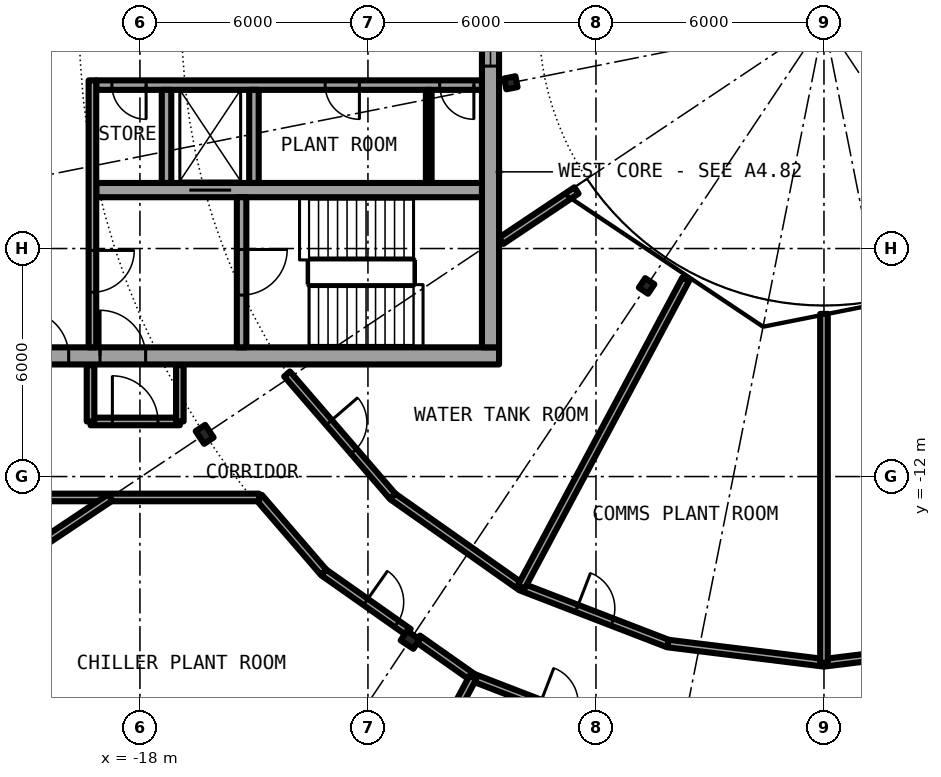
"""IFC4 building model, lengths in metres.
Left out: names, types, materials, properties, quantities, classifications, styles, units other than length and angle.
Written with IfcOpenShell. Run it as: python <this file> out.ifc"""

import sys

from ifc_helpers import new_model, si_unit, direction, frame, frame_2d, origin, origin_2d, place, context, subcontext, project, spatial, rectangle, i_section, extrude, element, fill, save


model = new_model("IFC4")
c1 = context("Model", 3, precision=1e-05, world=origin(), true_north=direction((0.0, 1.0)))
c2 = subcontext(c1, "Body", "Model", "MODEL_VIEW")
j1 = project(units=[si_unit("LENGTHUNIT", "METRE"), si_unit("PLANEANGLEUNIT", "RADIAN")], contexts=[c1])
p1 = place(None, origin())
s1 = spatial("IfcSite", under=j1, at=p1, CompositionType="ELEMENT")
p2 = place(p1, origin())
s2 = spatial("IfcBuilding", under=s1, at=p2, CompositionType="ELEMENT")
p3 = place(p2, frame((0.0, 0.0, 186.0)))
s3 = spatial("IfcBuildingStorey", under=s2, at=p3, CompositionType="ELEMENT", Elevation=186.0)
for number, where, z_axis, x_axis in (
    (1, (-16.297, -10.889, 0.0), (0.0, 0.0, 1.0), (-0.831, -0.556, 0.0)),
    (2, (-10.889, -16.297, 0.0), (0.0, 0.0, 1.0), (-0.556, -0.831, 0.0)),
):
    element("IfcColumn", number, at=place(p3, frame(where, z_axis=z_axis, x_axis=x_axis)), inside=s3, PredefinedType="COLUMN", context=c2, shape_type="SweptSolid", body=[
        extrude(i_section(OverallWidth=0.3, OverallDepth=0.4, WebThickness=0.013, FlangeThickness=0.024, FilletRadius=0.027, at=origin_2d()), origin(), (0.0, 0.0, 1.0), 4.2),
    ])
for number, where, z_axis, x_axis in (
    (3, (-8.239, -1.639, 0.0), (0.0, 0.0, 1.0), (-0.981, -0.195, 0.0)),
    (4, (-4.667, -6.984, 0.0), (0.0, 0.0, 1.0), (-0.556, -0.831, 0.0)),
):
    element("IfcColumn", number, at=place(p3, frame(where, z_axis=z_axis, x_axis=x_axis)), inside=s3, PredefinedType="COLUMN", context=c2, shape_type="SweptSolid", body=[
        extrude(i_section(OverallWidth=0.3, OverallDepth=0.29, WebThickness=0.009, FlangeThickness=0.014, FilletRadius=0.027, at=origin_2d()), origin(), (0.0, 0.0, 1.0), 4.2),
    ])
p4 = place(p3, frame((-23.967, -16.014, 0.0), z_axis=(0.0, 0.0, 1.0), x_axis=(0.634403999748, -0.773001659186, 0.0)))
e5 = element("IfcWall", 5, at=p4, inside=s3, PredefinedType="SOLIDWALL", context=c2, shape_type="SweptSolid", body=[
    extrude(rectangle(XDim=5.651, YDim=0.25, at=frame_2d((2.825, 0.0))), origin(), (0.0, 0.0, 1.0), 3.85),
])
p5 = place(p3, frame((-22.05, -8.825, 0.0), z_axis=(0.0, 0.0, 1.0), x_axis=(1.0, 0.0, 0.0)))
e6 = element("IfcWall", 6, at=p5, inside=s3, PredefinedType="SHEAR", context=c2, shape_type="SweptSolid", body=[
    extrude(rectangle(XDim=13.5, YDim=0.45, at=frame_2d((6.75, 0.0))), origin(), (0.0, 0.0, 1.0), 4.2),
])
p6 = place(p5, frame((0.975, 0.0, 0.0)))
e7 = element("IfcOpeningElement", 7, at=p6, cuts=e6, PredefinedType="OPENING", context=c2, shape_type="SweptSolid", body=[
    extrude(rectangle(XDim=1.2, YDim=2.3, at=frame_2d((0.6, 1.15))), frame((0.0, 0.235, 0.0), z_axis=(0.0, -1.0, 0.0), x_axis=(1.0, 0.0, 0.0)), (0.0, 0.0, 1.0), 0.47),
])
p7 = place(p5, frame((3.0, 0.0, 0.0)))
e8 = element("IfcOpeningElement", 8, at=p7, cuts=e6, PredefinedType="OPENING", context=c2, shape_type="SweptSolid", body=[
    extrude(rectangle(XDim=1.2, YDim=2.3, at=frame_2d((0.6, 1.15))), frame((0.0, 0.235, 0.0), z_axis=(0.0, -1.0, 0.0), x_axis=(1.0, 0.0, 0.0)), (0.0, 0.0, 1.0), 0.47),
])
p8 = place(p3, frame((-8.775, 8.6, 0.0), z_axis=(0.0, 0.0, 1.0), x_axis=(0.0, -1.0, 0.0)))
e9 = element("IfcWall", 9, at=p8, inside=s3, PredefinedType="SHEAR", context=c2, shape_type="SweptSolid", body=[
    extrude(rectangle(XDim=17.2, YDim=0.45, at=frame_2d((8.6, 0.0))), origin(), (0.0, 0.0, 1.0), 4.2),
])
p9 = place(p8, frame((7.4, 0.0, 0.1)))
e10 = element("IfcOpeningElement", 10, at=p9, cuts=e9, PredefinedType="OPENING", context=c2, shape_type="SweptSolid", body=[
    extrude(rectangle(XDim=2.4, YDim=2.2, at=frame_2d((1.2, 1.1))), frame((0.0, 0.235, 0.0), z_axis=(0.0, -1.0, 0.0), x_axis=(1.0, 0.0, 0.0)), (0.0, 0.0, 1.0), 0.47),
])
p10 = place(p3, frame((-9.0, -1.7, 0.0), z_axis=(0.0, 0.0, 1.0), x_axis=(-1.0, 0.0, 0.0)))
e11 = element("IfcWall", 11, at=p10, inside=s3, PredefinedType="SHEAR", context=c2, shape_type="SweptSolid", body=[
    extrude(rectangle(XDim=10.15, YDim=0.25, at=frame_2d((5.075, 0.0))), origin(), (0.0, 0.0, 1.0), 4.2),
])
p11 = place(p10, frame((0.212, 0.0, 0.0)))
e12 = element("IfcOpeningElement", 12, at=p11, cuts=e11, PredefinedType="OPENING", context=c2, shape_type="SweptSolid", body=[
    extrude(rectangle(XDim=0.9, YDim=2.3, at=frame_2d((0.45, 1.15))), frame((0.0, 0.135, 0.0), z_axis=(0.0, -1.0, 0.0), x_axis=(1.0, 0.0, 0.0)), (0.0, 0.0, 1.0), 0.27),
])
p12 = place(p10, frame((3.225, 0.0, 0.0)))
e13 = element("IfcOpeningElement", 13, at=p12, cuts=e11, PredefinedType="OPENING", context=c2, shape_type="SweptSolid", body=[
    extrude(rectangle(XDim=0.9, YDim=2.3, at=frame_2d((0.45, 1.15))), frame((0.0, 0.135, 0.0), z_axis=(0.0, -1.0, 0.0), x_axis=(1.0, 0.0, 0.0)), (0.0, 0.0, 1.0), 0.27),
])
p13 = place(p10, frame((8.837, 0.0, 0.0)))
e14 = element("IfcOpeningElement", 14, at=p13, cuts=e11, PredefinedType="OPENING", context=c2, shape_type="SweptSolid", body=[
    extrude(rectangle(XDim=0.9, YDim=2.3, at=frame_2d((0.45, 1.15))), frame((0.0, 0.135, 0.0), z_axis=(0.0, -1.0, 0.0), x_axis=(1.0, 0.0, 0.0)), (0.0, 0.0, 1.0), 0.27),
])
p14 = place(p3, frame((-9.0, -4.462, 0.0), z_axis=(0.0, 0.0, 1.0), x_axis=(-1.0, 0.0, 0.0)))
e15 = element("IfcWall", 15, at=p14, inside=s3, PredefinedType="SHEAR", context=c2, shape_type="SweptSolid", body=[
    extrude(rectangle(XDim=10.15, YDim=0.375, at=frame_2d((5.075, 0.0))), origin(), (0.0, 0.0, 1.0), 4.2),
])
p15 = place(p14, frame((6.6, 0.0, 0.0)))
e16 = element("IfcOpeningElement", 16, at=p15, cuts=e15, PredefinedType="OPENING", context=c2, shape_type="SweptSolid", body=[
    extrude(rectangle(XDim=1.1, YDim=2.3, at=frame_2d((0.55, 1.15))), frame((0.0, 0.198, 0.0), z_axis=(0.0, -1.0, 0.0), x_axis=(1.0, 0.0, 0.0)), (0.0, 0.0, 1.0), 0.395),
])
p16 = place(p3, frame((-15.325, -4.65, 0.0), z_axis=(0.0, 0.0, 1.0), x_axis=(0.0, -1.0, 0.0)))
e17 = element("IfcWall", 17, at=p16, inside=s3, PredefinedType="SHEAR", context=c2, shape_type="SweptSolid", body=[
    extrude(rectangle(XDim=3.95, YDim=0.25, at=frame_2d((1.975, 0.0))), origin(), (0.0, 0.0, 1.0), 4.2),
])
p17 = place(p16, frame((1.375, 0.0, 0.0)))
e18 = element("IfcOpeningElement", 18, at=p17, cuts=e17, PredefinedType="OPENING", context=c2, shape_type="SweptSolid", body=[
    extrude(rectangle(XDim=1.2, YDim=2.3, at=frame_2d((0.6, 1.15))), frame((0.0, 0.135, 0.0), z_axis=(0.0, -1.0, 0.0), x_axis=(1.0, 0.0, 0.0)), (0.0, 0.0, 1.0), 0.27),
])
for number, where, z_axis, x_axis in (
    (19, (-15.0, -1.825, 0.0), (0.0, 0.0, 1.0), (0.0, -1.0, 0.0)),
    (20, (-17.3, -1.825, 0.0), (0.0, 0.0, 1.0), (0.0, -1.0, 0.0)),
):
    element("IfcWall", number, at=place(p3, frame(where, z_axis=z_axis, x_axis=x_axis)), inside=s3, PredefinedType="SOLIDWALL", context=c2, shape_type="SweptSolid", body=[
        extrude(rectangle(XDim=2.45, YDim=0.25, at=frame_2d((1.225, 0.0))), origin(), (0.0, 0.0, 1.0), 3.85),
    ])
p18 = place(p3, frame((-19.25, -1.575, 0.0), z_axis=(0.0, 0.0, 1.0), x_axis=(0.0, -1.0, 0.0)))
e21 = element("IfcWall", 21, at=p18, inside=s3, PredefinedType="SOLIDWALL", context=c2, shape_type="SweptSolid", body=[
    extrude(rectangle(XDim=7.025, YDim=0.2, at=frame_2d((3.513, 0.0))), origin(), (0.0, 0.0, 1.0), 3.85),
])
p19 = place(p18, frame((4.475, 0.0, 0.0)))
e22 = element("IfcOpeningElement", 22, at=p19, cuts=e21, PredefinedType="OPENING", context=c2, shape_type="SweptSolid", body=[
    extrude(rectangle(XDim=1.1, YDim=2.3, at=frame_2d((0.55, 1.15))), frame((0.0, 0.11, 0.0), z_axis=(0.0, -1.0, 0.0), x_axis=(1.0, 0.0, 0.0)), (0.0, 0.0, 1.0), 0.22),
])
p20 = place(p3, frame((-10.4, -1.825, 0.0), z_axis=(0.0, 0.0, 1.0), x_axis=(0.0, -1.0, 0.0)))
e23 = element("IfcWall", 23, at=p20, inside=s3, PredefinedType="PARTITIONING", context=c2, shape_type="SweptSolid", body=[
    extrude(rectangle(XDim=2.45, YDim=0.15, at=frame_2d((1.225, 0.0))), origin(), (0.0, 0.0, 1.0), 3.85),
])
p21 = place(p3, frame((-14.868, -12.546, 0.0), z_axis=(0.0, 0.0, 1.0), x_axis=(0.653045064141, -0.757319050467, 0.0)))
e24 = element("IfcWall", 24, at=p21, inside=s3, PredefinedType="PARTITIONING", context=c2, shape_type="SweptSolid", body=[
    extrude(rectangle(XDim=2.611, YDim=0.2, at=frame_2d((1.305, 0.0))), origin(), (0.0, 0.0, 1.0), 3.85),
])
p22 = place(p3, frame((-13.163, -14.523, 0.0), z_axis=(0.0, 0.0, 1.0), x_axis=(0.817664396292, -0.57569517545, 0.0)))
e25 = element("IfcWall", 25, at=p22, inside=s3, PredefinedType="PARTITIONING", context=c2, shape_type="SweptSolid", body=[
    extrude(rectangle(XDim=2.727, YDim=0.2, at=frame_2d((1.364, 0.0))), origin(), (0.0, 0.0, 1.0), 3.6),
])
p23 = place(p22, frame((1.35, 0.0, 0.0)))
e26 = element("IfcOpeningElement", 26, at=p23, cuts=e25, PredefinedType="OPENING", context=c2, shape_type="SweptSolid", body=[
    extrude(rectangle(XDim=1.0, YDim=2.3, at=frame_2d((0.5, 1.15))), frame((0.0, 0.11, 0.0), z_axis=(0.0, -1.0, 0.0), x_axis=(1.0, 0.0, 0.0)), (0.0, 0.0, 1.0), 0.22),
])
p24 = place(p3, frame((-10.688, -16.266, 0.0), z_axis=(0.0, 0.0, 1.0), x_axis=(0.817772792535, -0.575541188613, 0.0)))
e27 = element("IfcWall", 27, at=p24, inside=s3, PredefinedType="PARTITIONING", context=c2, shape_type="SweptSolid", body=[
    extrude(rectangle(XDim=1.772, YDim=0.2, at=frame_2d((0.886, 0.0))), origin(), (0.0, 0.0, 1.0), 3.6),
])
p25 = place(p3, frame((-9.239, -17.286, 0.0), z_axis=(0.0, 0.0, 1.0), x_axis=(0.932988479706, -0.359906233255, 0.0)))
e28 = element("IfcWall", 28, at=p25, inside=s3, PredefinedType="PARTITIONING", context=c2, shape_type="SweptSolid", body=[
    extrude(rectangle(XDim=4.799, YDim=0.2, at=frame_2d((2.399, 0.0))), origin(), (0.0, 0.0, 1.0), 3.85),
])
p26 = place(p25, frame((1.899, 0.0, 0.0)))
e29 = element("IfcOpeningElement", 29, at=p26, cuts=e28, PredefinedType="OPENING", context=c2, shape_type="SweptSolid", body=[
    extrude(rectangle(XDim=1.0, YDim=2.3, at=frame_2d((0.5, 1.15))), frame((0.0, 0.11, 0.0), z_axis=(0.0, -1.0, 0.0), x_axis=(1.0, 0.0, 0.0)), (0.0, 0.0, 1.0), 0.22),
])
p27 = place(p3, frame((-14.129, -9.3, 0.0), z_axis=(0.0, 0.0, 1.0), x_axis=(0.65324486504, -0.757146713853, 0.0)))
e30 = element("IfcWall", 30, at=p27, inside=s3, PredefinedType="PARTITIONING", context=c2, shape_type="SweptSolid", body=[
    extrude(rectangle(XDim=4.255, YDim=0.2, at=frame_2d((2.128, 0.0))), origin(), (0.0, 0.0, 1.0), 3.85),
])
p28 = place(p27, frame((1.687, 0.0, 0.0)))
e31 = element("IfcOpeningElement", 31, at=p28, cuts=e30, PredefinedType="OPENING", context=c2, shape_type="SweptSolid", body=[
    extrude(rectangle(XDim=1.0, YDim=2.3, at=frame_2d((0.5, 1.15))), frame((0.0, 0.11, 0.0), z_axis=(0.0, -1.0, 0.0), x_axis=(1.0, 0.0, 0.0)), (0.0, 0.0, 1.0), 0.22),
])
p29 = place(p3, frame((-11.349, -12.522, 0.0), z_axis=(0.0, 0.0, 1.0), x_axis=(0.817567680547, -0.575832517079, 0.0)))
e32 = element("IfcWall", 32, at=p29, inside=s3, PredefinedType="PARTITIONING", context=c2, shape_type="SweptSolid", body=[
    extrude(rectangle(XDim=4.137, YDim=0.2, at=frame_2d((2.068, 0.0))), origin(), (0.0, 0.0, 1.0), 3.85),
])
p30 = place(p3, frame((-7.967, -14.904, 0.0), z_axis=(0.0, 0.0, 1.0), x_axis=(0.932943640288, -0.360022449363, 0.0)))
e33 = element("IfcWall", 33, at=p30, inside=s3, PredefinedType="PARTITIONING", context=c2, shape_type="SweptSolid", body=[
    extrude(rectangle(XDim=4.139, YDim=0.2, at=frame_2d((2.069, 0.0))), origin(), (0.0, 0.0, 1.0), 3.85),
])
p31 = place(p30, frame((1.569, 0.0, 0.0)))
e34 = element("IfcOpeningElement", 34, at=p31, cuts=e33, PredefinedType="OPENING", context=c2, shape_type="SweptSolid", body=[
    extrude(rectangle(XDim=1.0, YDim=2.3, at=frame_2d((0.5, 1.15))), frame((0.0, 0.11, 0.0), z_axis=(0.0, -1.0, 0.0), x_axis=(1.0, 0.0, 0.0)), (0.0, 0.0, 1.0), 0.22),
])
for number, where, z_axis, x_axis in (
    (35, (-4.106, -16.394, 0.0), (0.0, 0.0, 1.0), (0.992, -0.122, 0.0)),
    (36, (0.0, -16.9, 0.0), (0.0, 0.0, 1.0), (0.992, 0.122, 0.0)),
):
    element("IfcWall", number, at=place(p3, frame(where, z_axis=z_axis, x_axis=x_axis)), inside=s3, PredefinedType="PARTITIONING", context=c2, shape_type="SweptSolid", body=[
        extrude(rectangle(XDim=4.137, YDim=0.2, at=frame_2d((2.068, 0.0))), origin(), (0.0, 0.0, 1.0), 3.85),
    ])
p32 = place(p3, frame((-21.9, -12.55, 0.0), z_axis=(0.0, 0.0, 1.0), x_axis=(1.0, 0.0, 0.0)))
e37 = element("IfcWall", 37, at=p32, inside=s3, PredefinedType="PARTITIONING", context=c2, shape_type="SweptSolid", body=[
    extrude(rectangle(XDim=7.035, YDim=0.2, at=frame_2d((3.518, 0.0))), origin(), (0.0, 0.0, 1.0), 3.85),
])
p33 = place(p32, frame((0.45, 0.0, 0.0)))
e38 = element("IfcOpeningElement", 38, at=p33, cuts=e37, PredefinedType="OPENING", context=c2, shape_type="SweptSolid", body=[
    extrude(rectangle(XDim=1.0, YDim=2.3, at=frame_2d((0.5, 1.15))), frame((0.0, 0.11, 0.0), z_axis=(0.0, -1.0, 0.0), x_axis=(1.0, 0.0, 0.0)), (0.0, 0.0, 1.0), 0.22),
])
p34 = place(p3, frame((-19.3, -10.55, 0.0), z_axis=(0.0, 0.0, 1.0), x_axis=(1.0, 0.0, 0.0)))
e39 = element("IfcWall", 39, at=p34, inside=s3, PredefinedType="PARTITIONING", context=c2, shape_type="SweptSolid", body=[
    extrude(rectangle(XDim=2.35, YDim=0.2, at=frame_2d((1.175, 0.0))), origin(), (0.0, 0.0, 1.0), 3.85),
])
p35 = place(p34, frame((0.575, 0.0, 0.0)))
e40 = element("IfcOpeningElement", 40, at=p35, cuts=e39, PredefinedType="OPENING", context=c2, shape_type="SweptSolid", body=[
    extrude(rectangle(XDim=1.2, YDim=2.3, at=frame_2d((0.6, 1.15))), frame((0.0, 0.11, 0.0), z_axis=(0.0, -1.0, 0.0), x_axis=(1.0, 0.0, 0.0)), (0.0, 0.0, 1.0), 0.22),
])
p36 = place(p3, frame((-6.513, -4.472, 0.0), z_axis=(0.0, 0.0, 1.0), x_axis=(-0.831403409976, -0.555669299026, 0.0)))
e41 = element("IfcWall", 41, at=p36, inside=s3, PredefinedType="PARTITIONING", context=c2, shape_type="SweptSolid", body=[
    extrude(rectangle(XDim=2.383, YDim=0.2, at=frame_2d((1.191, 0.0))), origin(), (0.0, 0.0, 1.0), 3.85),
])
p37 = place(p3, frame((-22.594, -15.099, 0.0), z_axis=(0.0, 0.0, 1.0), x_axis=(0.831435525834, 0.555621243637, 0.0)))
e42 = element("IfcWall", 42, at=p37, inside=s3, PredefinedType="PARTITIONING", context=c2, shape_type="SweptSolid", body=[
    extrude(rectangle(XDim=4.586, YDim=0.2, at=frame_2d((2.293, 0.0))), origin(), (0.0, 0.0, 1.0), 3.85),
])
p38 = place(p3, frame((-12.81, -23.966, 0.0), z_axis=(0.0, 0.0, 1.0), x_axis=(0.471439510802, 0.881898399848, 0.0)))
e43 = element("IfcWall", 43, at=p38, inside=s3, PredefinedType="PARTITIONING", context=c2, shape_type="SweptSolid", body=[
    extrude(rectangle(XDim=7.575, YDim=0.2, at=frame_2d((3.787, 0.0))), origin(), (0.0, 0.0, 1.0), 3.85),
])
p39 = place(p3, frame((-7.966, -14.905, 0.0), z_axis=(0.0, 0.0, 1.0), x_axis=(0.471460365694, 0.881887251059, 0.0)))
e44 = element("IfcWall", 44, at=p39, inside=s3, PredefinedType="PARTITIONING", context=c2, shape_type="SweptSolid", body=[
    extrude(rectangle(XDim=9.18, YDim=0.2, at=frame_2d((4.59, 0.0))), origin(), (0.0, 0.0, 1.0), 3.85),
])
p40 = place(p3, frame((0.0, -16.9, 0.0), z_axis=(0.0, 0.0, 1.0), x_axis=(0.0, 1.0, 0.0)))
e45 = element("IfcWall", 45, at=p40, inside=s3, PredefinedType="PARTITIONING", context=c2, shape_type="SweptSolid", body=[
    extrude(rectangle(XDim=9.18, YDim=0.2, at=frame_2d((4.59, 0.0))), origin(), (0.0, 0.0, 1.0), 3.85),
])
for number, where, z_axis, x_axis in (
    (46, (-16.95, -10.55, 0.0), (0.0, 0.0, 1.0), (0.0, 1.0, 0.0)),
    (47, (-19.3, -10.55, 0.0), (0.0, 0.0, 1.0), (0.0, 1.0, 0.0)),
):
    element("IfcWall", number, at=place(p3, frame(where, z_axis=z_axis, x_axis=x_axis)), inside=s3, PredefinedType="PARTITIONING", context=c2, shape_type="SweptSolid", body=[
        extrude(rectangle(XDim=1.48, YDim=0.2, at=frame_2d((0.74, 0.0))), origin(), (0.0, 0.0, 1.0), 3.85),
    ])
p41 = place(p15, origin())
e48 = element("IfcDoor", 48, at=p41, inside=s3, OperationType="DOUBLE_DOOR_SLIDING", PredefinedType="DOOR", context=c2, shape_type="SweptSolid", body=[
    extrude(rectangle(XDim=1.1, YDim=2.3, at=frame_2d((0.55, 1.15))), frame((0.0, 0.025, 0.0), z_axis=(0.0, -1.0, 0.0), x_axis=(1.0, 0.0, 0.0)), (0.0, 0.0, 1.0), 0.05),
])
fill(e16, e48)
p42 = place(p11, origin())
e49 = element("IfcDoor", 49, at=p42, inside=s3, OperationType="SINGLE_SWING_RIGHT", PredefinedType="DOOR", context=c2, shape_type="SweptSolid", body=[
    extrude(rectangle(XDim=0.9, YDim=2.3, at=frame_2d((0.45, 1.15))), frame((0.0, 0.025, 0.0), z_axis=(0.0, -1.0, 0.0), x_axis=(1.0, 0.0, 0.0)), (0.0, 0.0, 1.0), 0.05),
])
fill(e12, e49)
p43 = place(p12, origin())
e50 = element("IfcDoor", 50, at=p43, inside=s3, OperationType="SINGLE_SWING_RIGHT", PredefinedType="DOOR", context=c2, shape_type="SweptSolid", body=[
    extrude(rectangle(XDim=0.9, YDim=2.3, at=frame_2d((0.45, 1.15))), frame((0.0, 0.025, 0.0), z_axis=(0.0, -1.0, 0.0), x_axis=(1.0, 0.0, 0.0)), (0.0, 0.0, 1.0), 0.05),
])
fill(e13, e50)
p44 = place(p13, origin())
e51 = element("IfcDoor", 51, at=p44, inside=s3, OperationType="SINGLE_SWING_LEFT", PredefinedType="DOOR", context=c2, shape_type="SweptSolid", body=[
    extrude(rectangle(XDim=0.9, YDim=2.3, at=frame_2d((0.45, 1.15))), frame((0.0, 0.025, 0.0), z_axis=(0.0, -1.0, 0.0), x_axis=(1.0, 0.0, 0.0)), (0.0, 0.0, 1.0), 0.05),
])
fill(e14, e51)
p45 = place(p17, origin())
e52 = element("IfcDoor", 52, at=p45, inside=s3, OperationType="SINGLE_SWING_LEFT", PredefinedType="DOOR", context=c2, shape_type="SweptSolid", body=[
    extrude(rectangle(XDim=1.2, YDim=2.3, at=frame_2d((0.6, 1.15))), frame((0.0, 0.025, 0.0), z_axis=(0.0, -1.0, 0.0), x_axis=(1.0, 0.0, 0.0)), (0.0, 0.0, 1.0), 0.05),
])
fill(e18, e52)
p46 = place(p19, origin())
e53 = element("IfcDoor", 53, at=p46, inside=s3, OperationType="SINGLE_SWING_LEFT", PredefinedType="DOOR", context=c2, shape_type="SweptSolid", body=[
    extrude(rectangle(XDim=1.1, YDim=2.3, at=frame_2d((0.55, 1.15))), frame((0.0, 0.025, 0.0), z_axis=(0.0, -1.0, 0.0), x_axis=(1.0, 0.0, 0.0)), (0.0, 0.0, 1.0), 0.05),
])
fill(e22, e53)
p47 = place(p6, origin())
e54 = element("IfcDoor", 54, at=p47, inside=s3, OperationType="SINGLE_SWING_RIGHT", PredefinedType="DOOR", context=c2, shape_type="SweptSolid", body=[
    extrude(rectangle(XDim=1.2, YDim=2.3, at=frame_2d((0.6, 1.15))), frame((0.0, 0.025, 0.0), z_axis=(0.0, -1.0, 0.0), x_axis=(1.0, 0.0, 0.0)), (0.0, 0.0, 1.0), 0.05),
])
fill(e7, e54)
p48 = place(p7, origin())
e55 = element("IfcDoor", 55, at=p48, inside=s3, OperationType="SINGLE_SWING_RIGHT", PredefinedType="DOOR", context=c2, shape_type="SweptSolid", body=[
    extrude(rectangle(XDim=1.2, YDim=2.3, at=frame_2d((0.6, 1.15))), frame((0.0, 0.025, 0.0), z_axis=(0.0, -1.0, 0.0), x_axis=(1.0, 0.0, 0.0)), (0.0, 0.0, 1.0), 0.05),
])
fill(e8, e55)
p49 = place(p9, origin())
e56 = element("IfcWindow", 56, at=p49, inside=s3, PartitioningType="SINGLE_PANEL", PredefinedType="WINDOW", context=c2, shape_type="SweptSolid", body=[
    extrude(rectangle(XDim=2.4, YDim=2.2, at=frame_2d((1.2, 1.1))), frame((0.0, 0.03, 0.0), z_axis=(0.0, -1.0, 0.0), x_axis=(1.0, 0.0, 0.0)), (0.0, 0.0, 1.0), 0.06),
])
fill(e10, e56)
p50 = place(p35, origin())
e57 = element("IfcDoor", 57, at=p50, inside=s3, OperationType="SINGLE_SWING_LEFT", PredefinedType="DOOR", context=c2, shape_type="SweptSolid", body=[
    extrude(rectangle(XDim=1.2, YDim=2.3, at=frame_2d((0.6, 1.15))), frame((0.0, 0.025, 0.0), z_axis=(0.0, -1.0, 0.0), x_axis=(1.0, 0.0, 0.0)), (0.0, 0.0, 1.0), 0.05),
])
fill(e40, e57)
p51 = place(p23, origin())
e58 = element("IfcDoor", 58, at=p51, inside=s3, OperationType="SINGLE_SWING_RIGHT", PredefinedType="DOOR", context=c2, shape_type="SweptSolid", body=[
    extrude(rectangle(XDim=1.0, YDim=2.3, at=frame_2d((0.5, 1.15))), frame((0.0, 0.025, 0.0), z_axis=(0.0, -1.0, 0.0), x_axis=(1.0, 0.0, 0.0)), (0.0, 0.0, 1.0), 0.05),
])
fill(e26, e58)
p52 = place(p28, origin())
e59 = element("IfcDoor", 59, at=p52, inside=s3, OperationType="SINGLE_SWING_LEFT", PredefinedType="DOOR", context=c2, shape_type="SweptSolid", body=[
    extrude(rectangle(XDim=1.0, YDim=2.3, at=frame_2d((0.5, 1.15))), frame((0.0, 0.025, 0.0), z_axis=(0.0, -1.0, 0.0), x_axis=(1.0, 0.0, 0.0)), (0.0, 0.0, 1.0), 0.05),
])
fill(e31, e59)
p53 = place(p31, origin())
e60 = element("IfcDoor", 60, at=p53, inside=s3, OperationType="SINGLE_SWING_LEFT", PredefinedType="DOOR", context=c2, shape_type="SweptSolid", body=[
    extrude(rectangle(XDim=1.0, YDim=2.3, at=frame_2d((0.5, 1.15))), frame((0.0, 0.025, 0.0), z_axis=(0.0, -1.0, 0.0), x_axis=(1.0, 0.0, 0.0)), (0.0, 0.0, 1.0), 0.05),
])
fill(e34, e60)
save(model, sys.argv[1])
